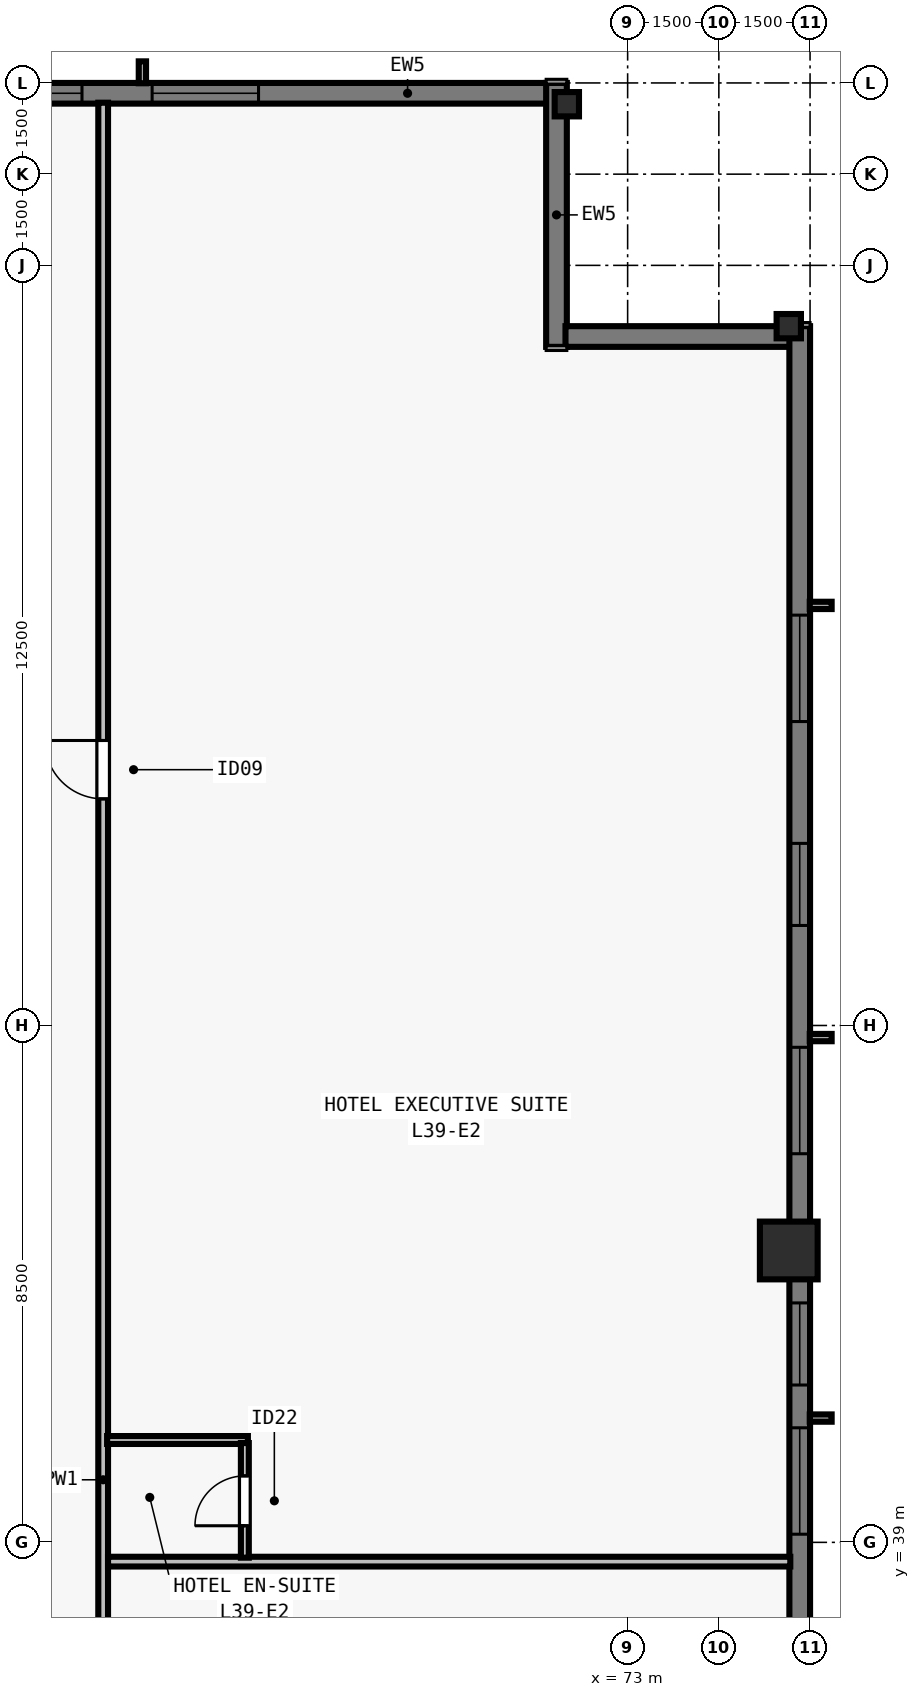
"""IFC4 building model, lengths in metres.
Left out: names, types, materials, properties, quantities, classifications, styles, units other than length and angle.
Written with IfcOpenShell. Run it as: python <this file> out.ifc"""

import sys

from ifc_helpers import new_model, si_unit, direction, frame, frame_2d, origin, origin_2d, place, context, subcontext, project, spatial, rectangle, i_section, extrude, element, fill, save


model = new_model("IFC4")
c1 = context("Model", 3, precision=1e-05, world=origin(), true_north=direction((0.0, 1.0)))
c2 = subcontext(c1, "Body", "Model", "MODEL_VIEW")
j1 = project(units=[si_unit("LENGTHUNIT", "METRE"), si_unit("PLANEANGLEUNIT", "RADIAN")], contexts=[c1])
p1 = place(None, origin())
s1 = spatial("IfcSite", under=j1, at=p1, CompositionType="ELEMENT")
p2 = place(p1, origin())
s2 = spatial("IfcBuilding", under=s1, at=p2, CompositionType="ELEMENT")
p3 = place(p2, frame((0.0, 0.0, 144.5)))
s3 = spatial("IfcBuildingStorey", under=s2, at=p3, CompositionType="ELEMENT", Elevation=144.5)
p4 = place(p3, frame((75.65, 43.8, 0.0), z_axis=(0.0, 0.0, 1.0), x_axis=(0.0, 1.0, 0.0)))
e1 = element("IfcColumn", 1, at=p4, inside=s3, PredefinedType="COLUMN", context=c2, shape_type="SweptSolid", body=[
    extrude(rectangle(XDim=0.95, YDim=0.95, at=origin_2d()), origin(), (0.0, 0.0, 1.0), 3.5),
])
for number, where, z_axis, x_axis in (
    (2, (75.65, 59.0, 0.0), (0.0, 0.0, 1.0), (0.0, 1.0, 0.0)),
    (3, (72.0, 62.65, 0.0), (0.0, 0.0, 1.0), (1.0, 0.0, 0.0)),
):
    element("IfcColumn", number, at=place(p3, frame(where, z_axis=z_axis, x_axis=x_axis)), inside=s3, PredefinedType="COLUMN", context=c2, shape_type="SweptSolid", body=[
        extrude(i_section(OverallWidth=0.4, OverallDepth=0.4, WebThickness=0.022, FlangeThickness=0.036, at=origin_2d()), origin(), (0.0, 0.0, 1.0), 3.5),
    ])
p5 = place(p3, frame((32.0, 62.83, 0.0), z_axis=(0.0, 0.0, 1.0), x_axis=(1.0, 0.0, 0.0)))
e4 = element("IfcWall", 4, at=p5, inside=s3, PredefinedType="SOLIDWALL", context=c2, shape_type="SweptSolid", body=[
    extrude(rectangle(XDim=39.682, YDim=0.34, at=frame_2d((19.841, 0.0))), origin(), (0.0, 0.0, 1.0), 3.28),
])
p6 = place(p5, frame((3.902, 0.0, 0.8)))
e5 = element("IfcOpeningElement", 5, at=p6, cuts=e4, PredefinedType="OPENING", context=c2, shape_type="SweptSolid", body=[
    extrude(rectangle(XDim=1.75, YDim=1.66, at=frame_2d((0.875, 0.83))), frame((0.0, 0.18, 0.0), z_axis=(0.0, -1.0, 0.0), x_axis=(1.0, 0.0, 0.0)), (0.0, 0.0, 1.0), 0.36),
])
p7 = place(p5, frame((8.505, 0.0, 0.8)))
e6 = element("IfcOpeningElement", 6, at=p7, cuts=e4, PredefinedType="OPENING", context=c2, shape_type="SweptSolid", body=[
    extrude(rectangle(XDim=1.35, YDim=1.66, at=frame_2d((0.675, 0.83))), frame((0.0, 0.18, 0.0), z_axis=(0.0, -1.0, 0.0), x_axis=(1.0, 0.0, 0.0)), (0.0, 0.0, 1.0), 0.36),
])
p8 = place(p5, frame((11.859, 0.0, 0.8)))
e7 = element("IfcOpeningElement", 7, at=p8, cuts=e4, PredefinedType="OPENING", context=c2, shape_type="SweptSolid", body=[
    extrude(rectangle(XDim=1.75, YDim=1.66, at=frame_2d((0.875, 0.83))), frame((0.0, 0.18, 0.0), z_axis=(0.0, -1.0, 0.0), x_axis=(1.0, 0.0, 0.0)), (0.0, 0.0, 1.0), 0.36),
])
p9 = place(p5, frame((16.062, 0.0, 0.8)))
e8 = element("IfcOpeningElement", 8, at=p9, cuts=e4, PredefinedType="OPENING", context=c2, shape_type="SweptSolid", body=[
    extrude(rectangle(XDim=1.35, YDim=1.66, at=frame_2d((0.675, 0.83))), frame((0.0, 0.18, 0.0), z_axis=(0.0, -1.0, 0.0), x_axis=(1.0, 0.0, 0.0)), (0.0, 0.0, 1.0), 0.36),
])
p10 = place(p5, frame((17.716, 0.0, 0.8)))
e9 = element("IfcOpeningElement", 9, at=p10, cuts=e4, PredefinedType="OPENING", context=c2, shape_type="SweptSolid", body=[
    extrude(rectangle(XDim=1.75, YDim=1.66, at=frame_2d((0.875, 0.83))), frame((0.0, 0.18, 0.0), z_axis=(0.0, -1.0, 0.0), x_axis=(1.0, 0.0, 0.0)), (0.0, 0.0, 1.0), 0.36),
])
p11 = place(p5, frame((22.719, 0.0, 0.8)))
e10 = element("IfcOpeningElement", 10, at=p11, cuts=e4, PredefinedType="OPENING", context=c2, shape_type="SweptSolid", body=[
    extrude(rectangle(XDim=1.35, YDim=1.66, at=frame_2d((0.675, 0.83))), frame((0.0, 0.18, 0.0), z_axis=(0.0, -1.0, 0.0), x_axis=(1.0, 0.0, 0.0)), (0.0, 0.0, 1.0), 0.36),
])
p12 = place(p5, frame((26.073, 0.0, 0.8)))
e11 = element("IfcOpeningElement", 11, at=p12, cuts=e4, PredefinedType="OPENING", context=c2, shape_type="SweptSolid", body=[
    extrude(rectangle(XDim=1.75, YDim=1.66, at=frame_2d((0.875, 0.83))), frame((0.0, 0.18, 0.0), z_axis=(0.0, -1.0, 0.0), x_axis=(1.0, 0.0, 0.0)), (0.0, 0.0, 1.0), 0.36),
])
p13 = place(p5, frame((30.677, 0.0, 0.8)))
e12 = element("IfcOpeningElement", 12, at=p13, cuts=e4, PredefinedType="OPENING", context=c2, shape_type="SweptSolid", body=[
    extrude(rectangle(XDim=1.35, YDim=1.66, at=frame_2d((0.675, 0.83))), frame((0.0, 0.18, 0.0), z_axis=(0.0, -1.0, 0.0), x_axis=(1.0, 0.0, 0.0)), (0.0, 0.0, 1.0), 0.36),
])
p14 = place(p5, frame((33.18, 0.0, 0.8)))
e13 = element("IfcOpeningElement", 13, at=p14, cuts=e4, PredefinedType="OPENING", context=c2, shape_type="SweptSolid", body=[
    extrude(rectangle(XDim=1.75, YDim=1.66, at=frame_2d((0.875, 0.83))), frame((0.0, 0.18, 0.0), z_axis=(0.0, -1.0, 0.0), x_axis=(1.0, 0.0, 0.0)), (0.0, 0.0, 1.0), 0.36),
])
p15 = place(p3, frame((71.83, 63.0, 0.0), z_axis=(0.0, 0.0, 1.0), x_axis=(0.0, -1.0, 0.0)))
e14 = element("IfcWall", 14, at=p15, inside=s3, PredefinedType="SOLIDWALL", context=c2, shape_type="SweptSolid", body=[
    extrude(rectangle(XDim=4.34, YDim=0.34, at=frame_2d((2.17, 0.0))), origin(), (0.0, 0.0, 1.0), 3.28),
])
p16 = place(p3, frame((71.978, 58.83, 0.0), z_axis=(0.0, 0.0, 1.0), x_axis=(1.0, 0.0, 0.0)))
e15 = element("IfcWall", 15, at=p16, inside=s3, PredefinedType="SOLIDWALL", context=c2, shape_type="SweptSolid", body=[
    extrude(rectangle(XDim=3.704, YDim=0.34, at=frame_2d((1.852, 0.0))), origin(), (0.0, 0.0, 1.0), 3.28),
])
p17 = place(p3, frame((75.83, 59.0, 0.0), z_axis=(0.0, 0.0, 1.0), x_axis=(0.0, -1.0, 0.0)))
e16 = element("IfcWall", 16, at=p17, inside=s3, PredefinedType="SOLIDWALL", context=c2, shape_type="SweptSolid", body=[
    extrude(rectangle(XDim=39.682, YDim=0.34, at=frame_2d((19.841, 0.0))), origin(), (0.0, 0.0, 1.0), 3.28),
])
p18 = place(p17, frame((4.752, 0.0, 0.8)))
e17 = element("IfcOpeningElement", 17, at=p18, cuts=e16, PredefinedType="OPENING", context=c2, shape_type="SweptSolid", body=[
    extrude(rectangle(XDim=1.75, YDim=1.66, at=frame_2d((0.875, 0.83))), frame((0.0, 0.18, 0.0), z_axis=(0.0, -1.0, 0.0), x_axis=(1.0, 0.0, 0.0)), (0.0, 0.0, 1.0), 0.36),
])
p19 = place(p17, frame((8.505, 0.0, 0.8)))
e18 = element("IfcOpeningElement", 18, at=p19, cuts=e16, PredefinedType="OPENING", context=c2, shape_type="SweptSolid", body=[
    extrude(rectangle(XDim=1.35, YDim=1.66, at=frame_2d((0.675, 0.83))), frame((0.0, 0.18, 0.0), z_axis=(0.0, -1.0, 0.0), x_axis=(1.0, 0.0, 0.0)), (0.0, 0.0, 1.0), 0.36),
])
p20 = place(p17, frame((11.859, 0.0, 0.8)))
e19 = element("IfcOpeningElement", 19, at=p20, cuts=e16, PredefinedType="OPENING", context=c2, shape_type="SweptSolid", body=[
    extrude(rectangle(XDim=1.75, YDim=1.66, at=frame_2d((0.875, 0.83))), frame((0.0, 0.18, 0.0), z_axis=(0.0, -1.0, 0.0), x_axis=(1.0, 0.0, 0.0)), (0.0, 0.0, 1.0), 0.36),
])
p21 = place(p17, frame((16.062, 0.0, 0.8)))
e20 = element("IfcOpeningElement", 20, at=p21, cuts=e16, PredefinedType="OPENING", context=c2, shape_type="SweptSolid", body=[
    extrude(rectangle(XDim=1.35, YDim=1.66, at=frame_2d((0.675, 0.83))), frame((0.0, 0.18, 0.0), z_axis=(0.0, -1.0, 0.0), x_axis=(1.0, 0.0, 0.0)), (0.0, 0.0, 1.0), 0.36),
])
p22 = place(p17, frame((18.116, 0.0, 0.8)))
e21 = element("IfcOpeningElement", 21, at=p22, cuts=e16, PredefinedType="OPENING", context=c2, shape_type="SweptSolid", body=[
    extrude(rectangle(XDim=1.75, YDim=1.66, at=frame_2d((0.875, 0.83))), frame((0.0, 0.18, 0.0), z_axis=(0.0, -1.0, 0.0), x_axis=(1.0, 0.0, 0.0)), (0.0, 0.0, 1.0), 0.36),
])
p23 = place(p17, frame((22.719, 0.0, 0.8)))
e22 = element("IfcOpeningElement", 22, at=p23, cuts=e16, PredefinedType="OPENING", context=c2, shape_type="SweptSolid", body=[
    extrude(rectangle(XDim=1.35, YDim=1.66, at=frame_2d((0.675, 0.83))), frame((0.0, 0.18, 0.0), z_axis=(0.0, -1.0, 0.0), x_axis=(1.0, 0.0, 0.0)), (0.0, 0.0, 1.0), 0.36),
])
p24 = place(p17, frame((26.073, 0.0, 0.8)))
e23 = element("IfcOpeningElement", 23, at=p24, cuts=e16, PredefinedType="OPENING", context=c2, shape_type="SweptSolid", body=[
    extrude(rectangle(XDim=1.75, YDim=1.66, at=frame_2d((0.875, 0.83))), frame((0.0, 0.18, 0.0), z_axis=(0.0, -1.0, 0.0), x_axis=(1.0, 0.0, 0.0)), (0.0, 0.0, 1.0), 0.36),
])
p25 = place(p17, frame((29.827, 0.0, 0.8)))
e24 = element("IfcOpeningElement", 24, at=p25, cuts=e16, PredefinedType="OPENING", context=c2, shape_type="SweptSolid", body=[
    extrude(rectangle(XDim=1.35, YDim=1.66, at=frame_2d((0.675, 0.83))), frame((0.0, 0.18, 0.0), z_axis=(0.0, -1.0, 0.0), x_axis=(1.0, 0.0, 0.0)), (0.0, 0.0, 1.0), 0.36),
])
p26 = place(p17, frame((33.18, 0.0, 0.8)))
e25 = element("IfcOpeningElement", 25, at=p26, cuts=e16, PredefinedType="OPENING", context=c2, shape_type="SweptSolid", body=[
    extrude(rectangle(XDim=1.75, YDim=1.66, at=frame_2d((0.875, 0.83))), frame((0.0, 0.18, 0.0), z_axis=(0.0, -1.0, 0.0), x_axis=(1.0, 0.0, 0.0)), (0.0, 0.0, 1.0), 0.36),
])
p27 = place(p3, frame((64.375, 15.325, 0.0), z_axis=(0.0, 0.0, 1.0), x_axis=(0.0, 1.0, 0.0)))
e26 = element("IfcWall", 26, at=p27, inside=s3, PredefinedType="PARTITIONING", context=c2, shape_type="SweptSolid", body=[
    extrude(rectangle(XDim=47.35, YDim=0.16, at=frame_2d((23.675, 0.0))), origin(), (0.0, 0.0, 1.0), 2.555),
])
p28 = place(p27, frame((12.547, 0.0, 0.0)))
e27 = element("IfcOpeningElement", 27, at=p28, cuts=e26, PredefinedType="OPENING", context=c2, shape_type="SweptSolid", body=[
    extrude(rectangle(XDim=0.96, YDim=2.15, at=frame_2d((0.48, 1.075))), frame((0.0, 0.09, 0.0), z_axis=(0.0, -1.0, 0.0), x_axis=(1.0, 0.0, 0.0)), (0.0, 0.0, 1.0), 0.18),
])
p29 = place(p27, frame((35.902, 0.0, 0.0)))
e28 = element("IfcOpeningElement", 28, at=p29, cuts=e26, PredefinedType="OPENING", context=c2, shape_type="SweptSolid", body=[
    extrude(rectangle(XDim=0.96, YDim=2.15, at=frame_2d((0.48, 1.075))), frame((0.0, 0.09, 0.0), z_axis=(0.0, -1.0, 0.0), x_axis=(1.0, 0.0, 0.0)), (0.0, 0.0, 1.0), 0.18),
])
p30 = place(p3, frame((64.455, 38.683, 0.0), z_axis=(0.0, 0.0, 1.0), x_axis=(1.0, 0.0, 0.0)))
e29 = element("IfcWall", 29, at=p30, inside=s3, PredefinedType="PARTITIONING", context=c2, shape_type="SweptSolid", body=[
    extrude(rectangle(XDim=11.22, YDim=0.16, at=frame_2d((5.61, 0.0))), origin(), (0.0, 0.0, 1.0), 3.28),
])
p31 = place(p3, frame((64.44, 40.683, 0.0), z_axis=(0.0, 0.0, 1.0), x_axis=(1.0, 0.0, 0.0)))
e30 = element("IfcWall", 30, at=p31, inside=s3, PredefinedType="PLUMBINGWALL", context=c2, shape_type="SweptSolid", body=[
    extrude(rectangle(XDim=2.315, YDim=0.13, at=frame_2d((1.157, 0.0))), origin(), (0.0, 0.0, 1.0), 3.28),
])
p32 = place(p3, frame((66.705, 38.748, 0.0), z_axis=(0.0, 0.0, 1.0), x_axis=(0.0, 1.0, 0.0)))
e31 = element("IfcWall", 31, at=p32, inside=s3, PredefinedType="PLUMBINGWALL", context=c2, shape_type="SweptSolid", body=[
    extrude(rectangle(XDim=1.885, YDim=0.13, at=frame_2d((0.942, 0.0))), origin(), (0.0, 0.0, 1.0), 3.28),
])
p33 = place(p32, frame((0.525, 0.0, 0.0)))
e32 = element("IfcOpeningElement", 32, at=p33, cuts=e31, PredefinedType="OPENING", context=c2, shape_type="SweptSolid", body=[
    extrude(rectangle(XDim=0.82, YDim=2.1, at=frame_2d((0.41, 1.05))), frame((0.0, 0.075, 0.0), z_axis=(0.0, -1.0, 0.0), x_axis=(1.0, 0.0, 0.0)), (0.0, 0.0, 1.0), 0.15),
])
p34 = place(p13, origin())
e33 = element("IfcWindow", 33, at=p34, inside=s3, PartitioningType="SINGLE_PANEL", PredefinedType="WINDOW", context=c2, shape_type="SweptSolid", body=[
    extrude(rectangle(XDim=1.35, YDim=1.66, at=frame_2d((0.675, 0.83))), frame((0.0, -0.05, 0.0), z_axis=(0.0, -1.0, 0.0), x_axis=(1.0, 0.0, 0.0)), (0.0, 0.0, 1.0), 0.06),
])
fill(e12, e33)
p35 = place(p14, origin())
e34 = element("IfcWindow", 34, at=p35, inside=s3, PartitioningType="SINGLE_PANEL", PredefinedType="WINDOW", context=c2, shape_type="SweptSolid", body=[
    extrude(rectangle(XDim=1.75, YDim=1.66, at=frame_2d((0.875, 0.83))), frame((0.0, -0.05, 0.0), z_axis=(0.0, -1.0, 0.0), x_axis=(1.0, 0.0, 0.0)), (0.0, 0.0, 1.0), 0.06),
])
fill(e13, e34)
p36 = place(p18, origin())
e35 = element("IfcWindow", 35, at=p36, inside=s3, PartitioningType="SINGLE_PANEL", PredefinedType="WINDOW", context=c2, shape_type="SweptSolid", body=[
    extrude(rectangle(XDim=1.75, YDim=1.66, at=frame_2d((0.875, 0.83))), frame((0.0, -0.05, 0.0), z_axis=(0.0, -1.0, 0.0), x_axis=(1.0, 0.0, 0.0)), (0.0, 0.0, 1.0), 0.06),
])
fill(e17, e35)
p37 = place(p19, origin())
e36 = element("IfcWindow", 36, at=p37, inside=s3, PartitioningType="SINGLE_PANEL", PredefinedType="WINDOW", context=c2, shape_type="SweptSolid", body=[
    extrude(rectangle(XDim=1.35, YDim=1.66, at=frame_2d((0.675, 0.83))), frame((0.0, -0.05, 0.0), z_axis=(0.0, -1.0, 0.0), x_axis=(1.0, 0.0, 0.0)), (0.0, 0.0, 1.0), 0.06),
])
fill(e18, e36)
p38 = place(p20, origin())
e37 = element("IfcWindow", 37, at=p38, inside=s3, PartitioningType="SINGLE_PANEL", PredefinedType="WINDOW", context=c2, shape_type="SweptSolid", body=[
    extrude(rectangle(XDim=1.75, YDim=1.66, at=frame_2d((0.875, 0.83))), frame((0.0, -0.05, 0.0), z_axis=(0.0, -1.0, 0.0), x_axis=(1.0, 0.0, 0.0)), (0.0, 0.0, 1.0), 0.06),
])
fill(e19, e37)
p39 = place(p21, origin())
e38 = element("IfcWindow", 38, at=p39, inside=s3, PartitioningType="SINGLE_PANEL", PredefinedType="WINDOW", context=c2, shape_type="SweptSolid", body=[
    extrude(rectangle(XDim=1.35, YDim=1.66, at=frame_2d((0.675, 0.83))), frame((0.0, -0.05, 0.0), z_axis=(0.0, -1.0, 0.0), x_axis=(1.0, 0.0, 0.0)), (0.0, 0.0, 1.0), 0.06),
])
fill(e20, e38)
p40 = place(p22, origin())
e39 = element("IfcWindow", 39, at=p40, inside=s3, PartitioningType="SINGLE_PANEL", PredefinedType="WINDOW", context=c2, shape_type="SweptSolid", body=[
    extrude(rectangle(XDim=1.75, YDim=1.66, at=frame_2d((0.875, 0.83))), frame((0.0, -0.05, 0.0), z_axis=(0.0, -1.0, 0.0), x_axis=(1.0, 0.0, 0.0)), (0.0, 0.0, 1.0), 0.06),
])
fill(e21, e39)
p41 = place(p33, origin())
e40 = element("IfcDoor", 40, at=p41, inside=s3, OperationType="SINGLE_SWING_LEFT", PredefinedType="DOOR", context=c2, shape_type="SweptSolid", body=[
    extrude(rectangle(XDim=0.82, YDim=2.1, at=frame_2d((0.41, 1.05))), frame((0.0, 0.025, 0.0), z_axis=(0.0, -1.0, 0.0), x_axis=(1.0, 0.0, 0.0)), (0.0, 0.0, 1.0), 0.05),
])
fill(e32, e40)
p42 = place(p29, origin())
e41 = element("IfcDoor", 41, at=p42, inside=s3, OperationType="SINGLE_SWING_RIGHT", PredefinedType="DOOR", context=c2, shape_type="SweptSolid", body=[
    extrude(rectangle(XDim=0.96, YDim=2.15, at=frame_2d((0.48, 1.075))), frame((0.0, 0.025, 0.0), z_axis=(0.0, -1.0, 0.0), x_axis=(1.0, 0.0, 0.0)), (0.0, 0.0, 1.0), 0.05),
])
fill(e28, e41)
save(model, sys.argv[1])
